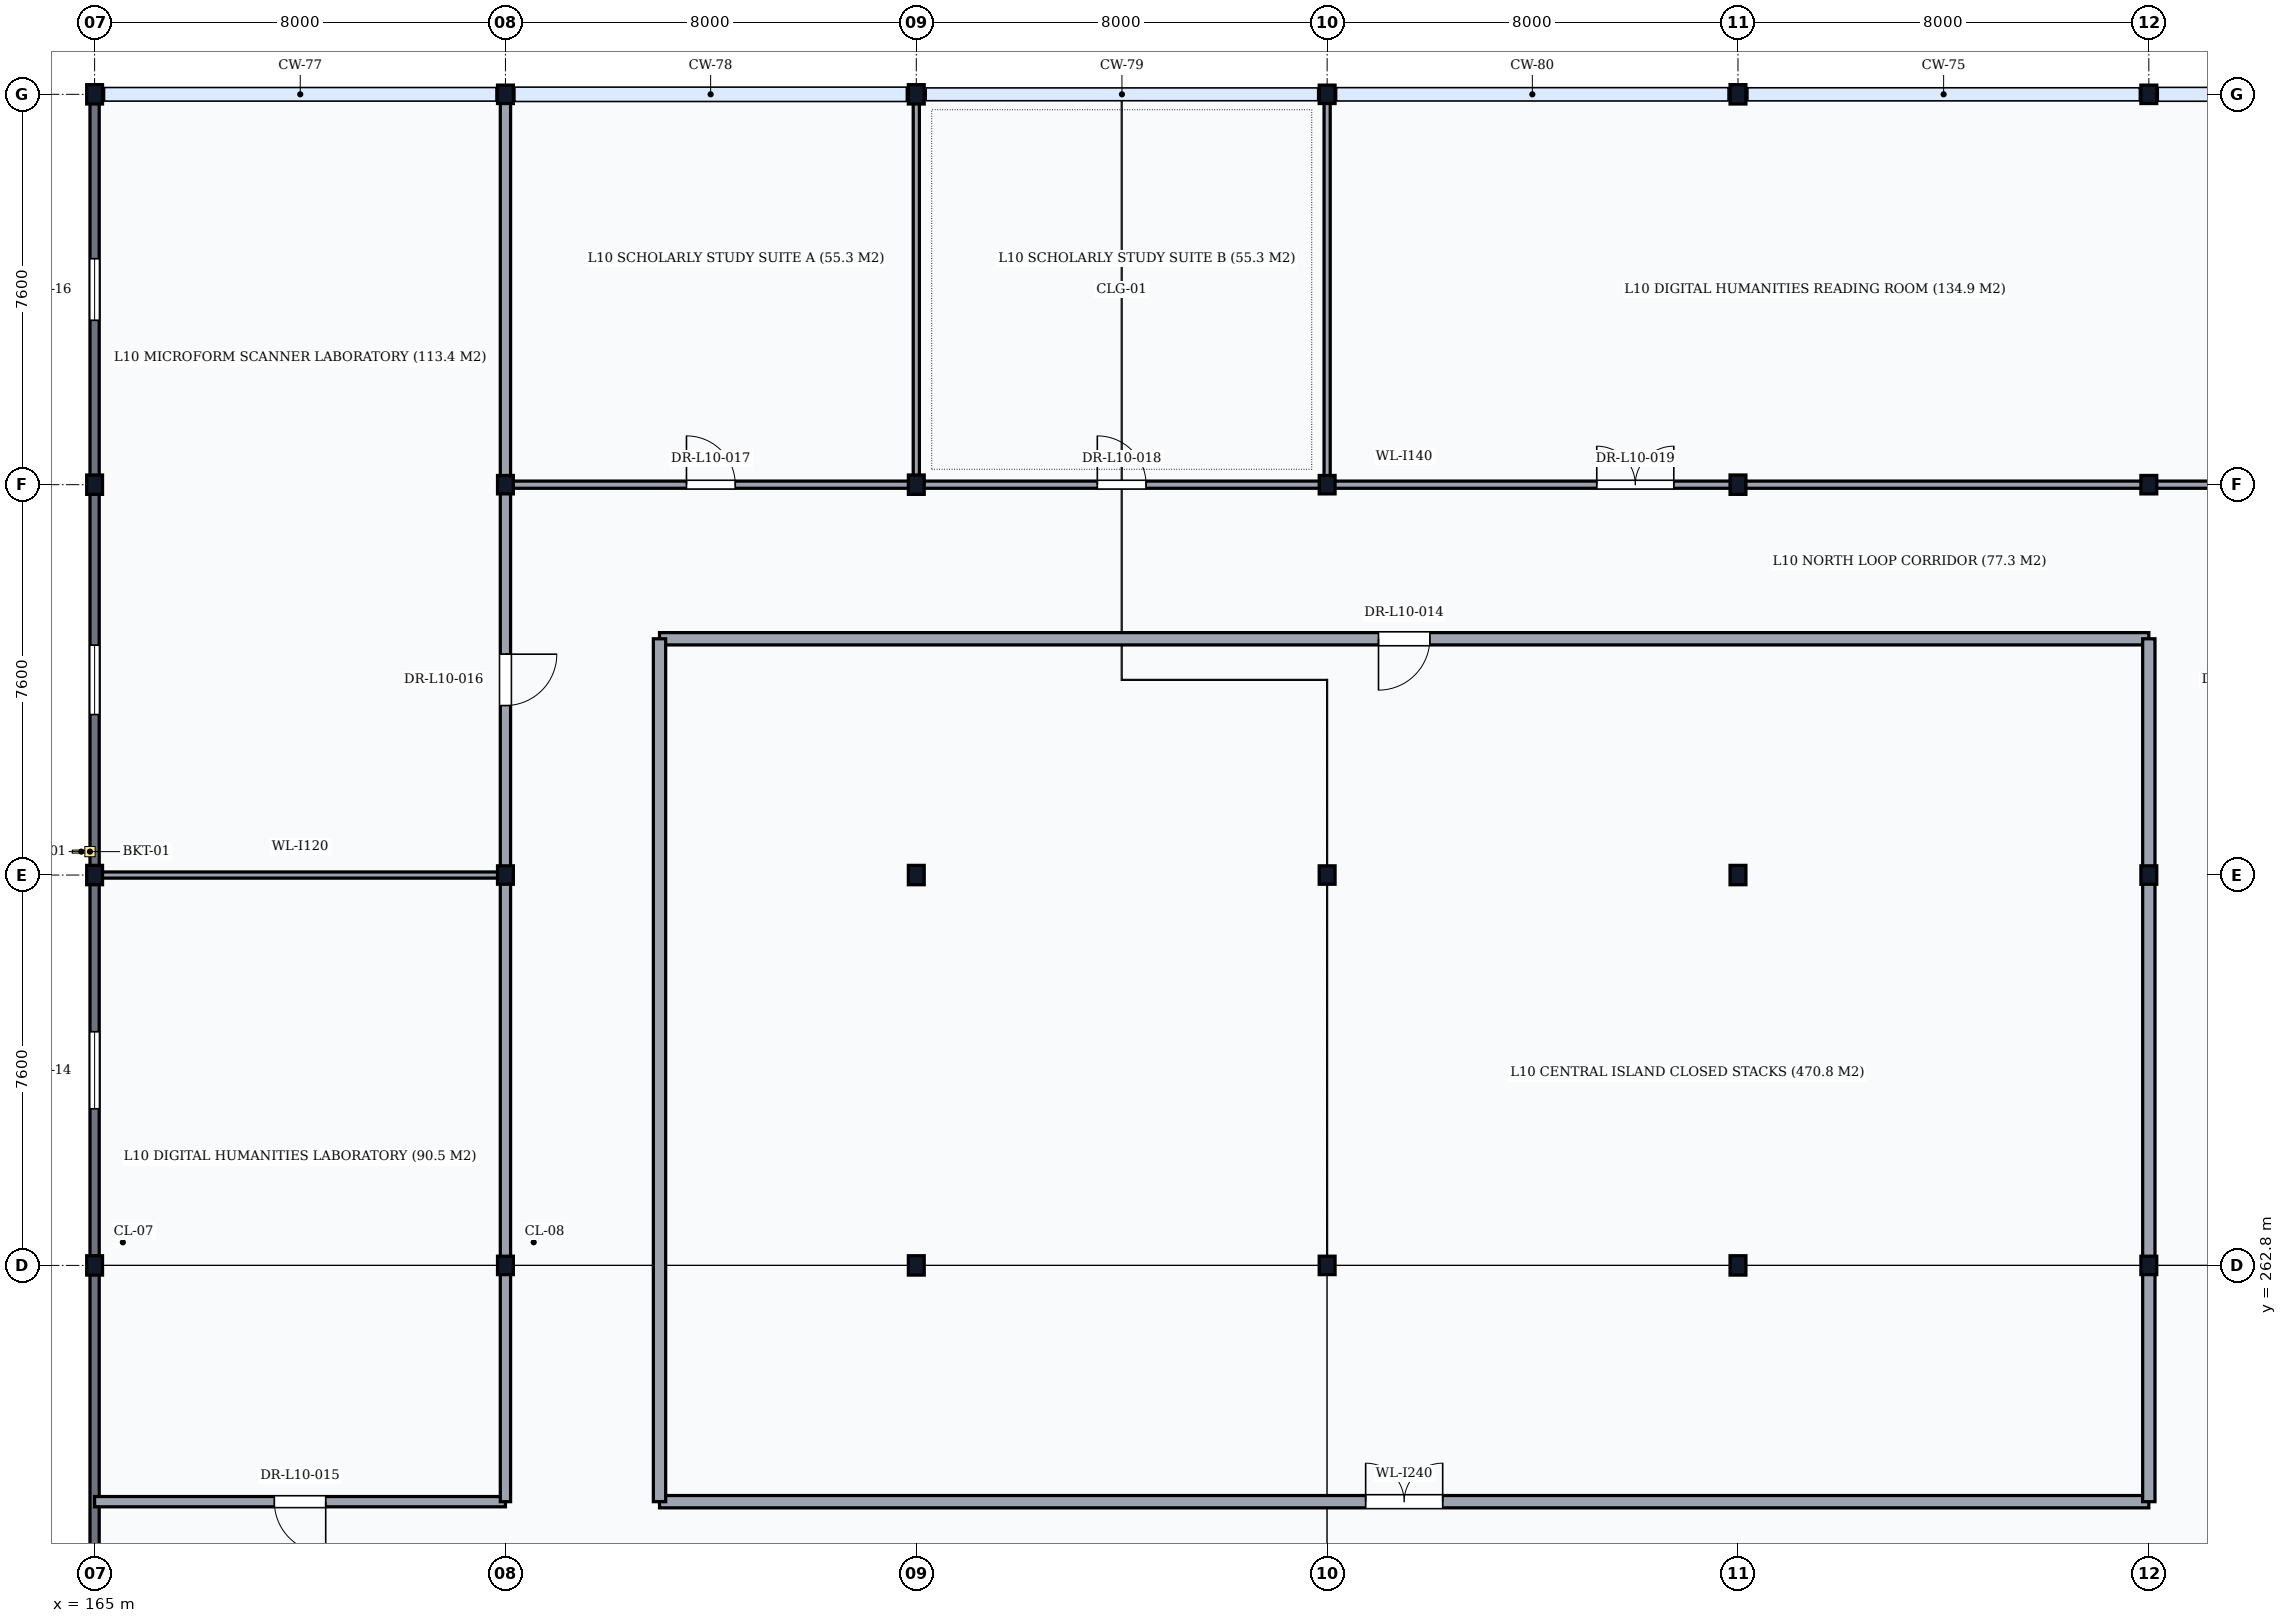
"""IFC4 building model, lengths in metres.
Left out: names, types, materials, properties, quantities, classifications, styles, units other than length and angle.
Written with IfcOpenShell. Run it as: python <this file> out.ifc"""

import sys

from ifc_helpers import new_model, si_unit, direction, frame, frame_2d, origin, origin_2d, place, context, subcontext, project, spatial, rectangle, i_section, extrude, element, fill, save


model = new_model("IFC4")
c1 = context("Model", 3, precision=1e-05, world=origin(), true_north=direction((0.0, 1.0)))
c2 = subcontext(c1, "Body", "Model", "MODEL_VIEW")
j1 = project(units=[si_unit("LENGTHUNIT", "METRE"), si_unit("PLANEANGLEUNIT", "RADIAN")], contexts=[c1])
p1 = place(None, origin())
s1 = spatial("IfcSite", under=j1, at=p1, CompositionType="ELEMENT")
p2 = place(p1, origin())
s2 = spatial("IfcBuilding", under=s1, at=p2, CompositionType="ELEMENT")
p3 = place(p2, frame((0.0, 0.0, 39.9)))
s3 = spatial("IfcBuildingStorey", under=s2, at=p3, CompositionType="ELEMENT", Elevation=39.9)
for number, where, z_axis, x_axis in (
    (1, (165.0, 262.8, 0.0), (0.0, 0.0, 1.0), (1.0, 0.0, 0.0)),
    (2, (165.0, 270.4, 0.0), (0.0, 0.0, 1.0), (1.0, 0.0, 0.0)),
    (3, (165.0, 278.0, 0.0), (0.0, 0.0, 1.0), (1.0, 0.0, 0.0)),
    (4, (165.0, 285.6, 0.0), (0.0, 0.0, 1.0), (1.0, 0.0, 0.0)),
):
    element("IfcColumn", number, at=place(p3, frame(where, z_axis=z_axis, x_axis=x_axis)), inside=s3, PredefinedType="COLUMN", context=c2, shape_type="SweptSolid", body=[
        extrude(i_section(OverallWidth=0.309, OverallDepth=0.377, WebThickness=0.021, FlangeThickness=0.04, FilletRadius=0.027, at=origin_2d()), origin(), (0.0, 0.0, 1.0), 3.9),
    ])
for number, where, z_axis, x_axis in (
    (5, (173.0, 262.8, 0.0), (0.0, 0.0, 1.0), (1.0, 0.0, 0.0)),
    (6, (173.0, 270.4, 0.0), (0.0, 0.0, 1.0), (1.0, 0.0, 0.0)),
    (7, (173.0, 278.0, 0.0), (0.0, 0.0, 1.0), (1.0, 0.0, 0.0)),
    (8, (173.0, 285.6, 0.0), (0.0, 0.0, 1.0), (1.0, 0.0, 0.0)),
):
    element("IfcColumn", number, at=place(p3, frame(where, z_axis=z_axis, x_axis=x_axis)), inside=s3, PredefinedType="COLUMN", context=c2, shape_type="SweptSolid", body=[
        extrude(i_section(OverallWidth=0.309, OverallDepth=0.359, WebThickness=0.021, FlangeThickness=0.04, FilletRadius=0.027, at=origin_2d()), origin(), (0.0, 0.0, 1.0), 3.9),
    ])
for number, where, z_axis, x_axis in (
    (9, (181.0, 262.8, 0.0), (0.0, 0.0, 1.0), (1.0, 0.0, 0.0)),
    (10, (181.0, 270.4, 0.0), (0.0, 0.0, 1.0), (1.0, 0.0, 0.0)),
    (11, (181.0, 278.0, 0.0), (0.0, 0.0, 1.0), (1.0, 0.0, 0.0)),
    (12, (181.0, 285.6, 0.0), (0.0, 0.0, 1.0), (1.0, 0.0, 0.0)),
):
    element("IfcColumn", number, at=place(p3, frame(where, z_axis=z_axis, x_axis=x_axis)), inside=s3, PredefinedType="COLUMN", context=c2, shape_type="SweptSolid", body=[
        extrude(i_section(OverallWidth=0.309, OverallDepth=0.377, WebThickness=0.021, FlangeThickness=0.04, FilletRadius=0.027, at=origin_2d()), origin(), (0.0, 0.0, 1.0), 3.9),
    ])
for number, where, z_axis, x_axis in (
    (13, (189.0, 262.8, 0.0), (0.0, 0.0, 1.0), (1.0, 0.0, 0.0)),
    (14, (189.0, 270.4, 0.0), (0.0, 0.0, 1.0), (1.0, 0.0, 0.0)),
    (15, (189.0, 278.0, 0.0), (0.0, 0.0, 1.0), (1.0, 0.0, 0.0)),
    (16, (189.0, 285.6, 0.0), (0.0, 0.0, 1.0), (1.0, 0.0, 0.0)),
):
    element("IfcColumn", number, at=place(p3, frame(where, z_axis=z_axis, x_axis=x_axis)), inside=s3, PredefinedType="COLUMN", context=c2, shape_type="SweptSolid", body=[
        extrude(i_section(OverallWidth=0.309, OverallDepth=0.359, WebThickness=0.021, FlangeThickness=0.04, FilletRadius=0.027, at=origin_2d()), origin(), (0.0, 0.0, 1.0), 3.9),
    ])
for number, where, z_axis, x_axis in (
    (17, (197.0, 262.8, 0.0), (0.0, 0.0, 1.0), (1.0, 0.0, 0.0)),
    (18, (197.0, 270.4, 0.0), (0.0, 0.0, 1.0), (1.0, 0.0, 0.0)),
    (19, (197.0, 278.0, 0.0), (0.0, 0.0, 1.0), (1.0, 0.0, 0.0)),
    (20, (197.0, 285.6, 0.0), (0.0, 0.0, 1.0), (1.0, 0.0, 0.0)),
):
    element("IfcColumn", number, at=place(p3, frame(where, z_axis=z_axis, x_axis=x_axis)), inside=s3, PredefinedType="COLUMN", context=c2, shape_type="SweptSolid", body=[
        extrude(i_section(OverallWidth=0.309, OverallDepth=0.377, WebThickness=0.021, FlangeThickness=0.04, FilletRadius=0.027, at=origin_2d()), origin(), (0.0, 0.0, 1.0), 3.9),
    ])
for number, where, z_axis, x_axis in (
    (21, (205.0, 262.8, 0.0), (0.0, 0.0, 1.0), (1.0, 0.0, 0.0)),
    (22, (205.0, 270.4, 0.0), (0.0, 0.0, 1.0), (1.0, 0.0, 0.0)),
    (23, (205.0, 278.0, 0.0), (0.0, 0.0, 1.0), (1.0, 0.0, 0.0)),
    (24, (205.0, 285.6, 0.0), (0.0, 0.0, 1.0), (1.0, 0.0, 0.0)),
):
    element("IfcColumn", number, at=place(p3, frame(where, z_axis=z_axis, x_axis=x_axis)), inside=s3, PredefinedType="COLUMN", context=c2, shape_type="SweptSolid", body=[
        extrude(i_section(OverallWidth=0.309, OverallDepth=0.359, WebThickness=0.021, FlangeThickness=0.04, FilletRadius=0.027, at=origin_2d()), origin(), (0.0, 0.0, 1.0), 3.9),
    ])
p4 = place(p3, frame((165.0, 255.206, 0.0), z_axis=(0.0, 0.0, 1.0), x_axis=(0.0, 1.0, 0.0)))
e25 = element("IfcWall", 25, at=p4, inside=s3, PredefinedType="SOLIDWALL", context=c2, shape_type="SweptSolid", body=[
    extrude(rectangle(XDim=7.588, YDim=0.18, at=frame_2d((3.794, 0.0))), origin(), (0.0, 0.0, 1.0), 3.408),
])
p5 = place(p3, frame((165.0, 262.806, 0.0), z_axis=(0.0, 0.0, 1.0), x_axis=(0.0, 1.0, 0.0)))
e26 = element("IfcWall", 26, at=p5, inside=s3, PredefinedType="SOLIDWALL", context=c2, shape_type="SweptSolid", body=[
    extrude(rectangle(XDim=7.588, YDim=0.18, at=frame_2d((3.794, 0.0))), origin(), (0.0, 0.0, 1.0), 3.408),
])
p6 = place(p5, frame((3.044, 0.0, 0.95)))
e27 = element("IfcOpeningElement", 27, at=p6, cuts=e26, PredefinedType="OPENING", context=c2, shape_type="SweptSolid", body=[
    extrude(rectangle(XDim=1.5, YDim=1.9, at=frame_2d((0.75, 0.95))), frame((0.0, 0.105, 0.0), z_axis=(0.0, -1.0, 0.0), x_axis=(1.0, 0.0, 0.0)), (0.0, 0.0, 1.0), 0.21),
])
p7 = place(p3, frame((165.0, 270.406, 0.0), z_axis=(0.0, 0.0, 1.0), x_axis=(0.0, 1.0, 0.0)))
e28 = element("IfcWall", 28, at=p7, inside=s3, PredefinedType="SOLIDWALL", context=c2, shape_type="SweptSolid", body=[
    extrude(rectangle(XDim=7.588, YDim=0.18, at=frame_2d((3.794, 0.0))), origin(), (0.0, 0.0, 1.0), 3.408),
])
p8 = place(p7, frame((3.119, 0.0, 0.95)))
e29 = element("IfcOpeningElement", 29, at=p8, cuts=e28, PredefinedType="OPENING", context=c2, shape_type="SweptSolid", body=[
    extrude(rectangle(XDim=1.35, YDim=1.8, at=frame_2d((0.675, 0.9))), frame((0.0, 0.105, 0.0), z_axis=(0.0, -1.0, 0.0), x_axis=(1.0, 0.0, 0.0)), (0.0, 0.0, 1.0), 0.21),
])
p9 = place(p3, frame((165.0, 278.006, 0.0), z_axis=(0.0, 0.0, 1.0), x_axis=(0.0, 1.0, 0.0)))
e30 = element("IfcWall", 30, at=p9, inside=s3, PredefinedType="SOLIDWALL", context=c2, shape_type="SweptSolid", body=[
    extrude(rectangle(XDim=7.588, YDim=0.18, at=frame_2d((3.794, 0.0))), origin(), (0.0, 0.0, 1.0), 3.408),
])
p10 = place(p9, frame((3.194, 0.0, 0.95)))
e31 = element("IfcOpeningElement", 31, at=p10, cuts=e30, PredefinedType="OPENING", context=c2, shape_type="SweptSolid", body=[
    extrude(rectangle(XDim=1.2, YDim=1.8, at=frame_2d((0.6, 0.9))), frame((0.0, 0.105, 0.0), z_axis=(0.0, -1.0, 0.0), x_axis=(1.0, 0.0, 0.0)), (0.0, 0.0, 1.0), 0.21),
])
p11 = place(p3, frame((176.0, 258.2, 0.0), z_axis=(0.0, 0.0, 1.0), x_axis=(1.0, 0.0, 0.0)))
e32 = element("IfcWall", 32, at=p11, inside=s3, PredefinedType="PARTITIONING", context=c2, shape_type="SweptSolid", body=[
    extrude(rectangle(XDim=29.0, YDim=0.24, at=frame_2d((14.5, 0.0))), origin(), (0.0, 0.0, 1.0), 3.68),
])
p12 = place(p11, frame((13.75, 0.0, 0.0)))
e33 = element("IfcOpeningElement", 33, at=p12, cuts=e32, PredefinedType="OPENING", context=c2, shape_type="SweptSolid", body=[
    extrude(rectangle(XDim=1.5, YDim=2.1, at=frame_2d((0.75, 1.05))), frame((0.0, 0.135, 0.0), z_axis=(0.0, -1.0, 0.0), x_axis=(1.0, 0.0, 0.0)), (0.0, 0.0, 1.0), 0.27),
])
p13 = place(p3, frame((176.0, 275.0, 0.0), z_axis=(0.0, 0.0, 1.0), x_axis=(1.0, 0.0, 0.0)))
e34 = element("IfcWall", 34, at=p13, inside=s3, PredefinedType="PARTITIONING", context=c2, shape_type="SweptSolid", body=[
    extrude(rectangle(XDim=29.0, YDim=0.24, at=frame_2d((14.5, 0.0))), origin(), (0.0, 0.0, 1.0), 3.68),
])
p14 = place(p13, frame((14.0, 0.0, 0.0)))
e35 = element("IfcOpeningElement", 35, at=p14, cuts=e34, PredefinedType="OPENING", context=c2, shape_type="SweptSolid", body=[
    extrude(rectangle(XDim=1.0, YDim=2.1, at=frame_2d((0.5, 1.05))), frame((0.0, 0.135, 0.0), z_axis=(0.0, -1.0, 0.0), x_axis=(1.0, 0.0, 0.0)), (0.0, 0.0, 1.0), 0.27),
])
p15 = place(p3, frame((176.0, 258.2, 0.0), z_axis=(0.0, 0.0, 1.0), x_axis=(0.0, 1.0, 0.0)))
e36 = element("IfcWall", 36, at=p15, inside=s3, PredefinedType="PARTITIONING", context=c2, shape_type="SweptSolid", body=[
    extrude(rectangle(XDim=16.8, YDim=0.24, at=frame_2d((8.4, 0.0))), origin(), (0.0, 0.0, 1.0), 3.68),
])
p16 = place(p3, frame((205.0, 258.2, 0.0), z_axis=(0.0, 0.0, 1.0), x_axis=(0.0, 1.0, 0.0)))
e37 = element("IfcWall", 37, at=p16, inside=s3, PredefinedType="PARTITIONING", context=c2, shape_type="SweptSolid", body=[
    extrude(rectangle(XDim=16.8, YDim=0.24, at=frame_2d((8.4, 0.0))), origin(), (0.0, 0.0, 1.0), 3.278),
])
p17 = place(p3, frame((165.0, 258.2, 0.0), z_axis=(0.0, 0.0, 1.0), x_axis=(1.0, 0.0, 0.0)))
e38 = element("IfcWall", 38, at=p17, inside=s3, PredefinedType="PARTITIONING", context=c2, shape_type="SweptSolid", body=[
    extrude(rectangle(XDim=8.0, YDim=0.2, at=frame_2d((4.0, 0.0))), origin(), (0.0, 0.0, 1.0), 3.68),
])
p18 = place(p17, frame((3.5, 0.0, 0.0)))
e39 = element("IfcOpeningElement", 39, at=p18, cuts=e38, PredefinedType="OPENING", context=c2, shape_type="SweptSolid", body=[
    extrude(rectangle(XDim=1.0, YDim=2.1, at=frame_2d((0.5, 1.05))), frame((0.0, 0.115, 0.0), z_axis=(0.0, -1.0, 0.0), x_axis=(1.0, 0.0, 0.0)), (0.0, 0.0, 1.0), 0.23),
])
p19 = place(p3, frame((173.0, 258.2, 0.0), z_axis=(0.0, 0.0, 1.0), x_axis=(0.0, 1.0, 0.0)))
e40 = element("IfcWall", 40, at=p19, inside=s3, PredefinedType="PARTITIONING", context=c2, shape_type="SweptSolid", body=[
    extrude(rectangle(XDim=27.4, YDim=0.2, at=frame_2d((13.7, 0.0))), origin(), (0.0, 0.0, 1.0), 3.278),
])
p20 = place(p19, frame((15.5, 0.0, 0.0)))
e41 = element("IfcOpeningElement", 41, at=p20, cuts=e40, PredefinedType="OPENING", context=c2, shape_type="SweptSolid", body=[
    extrude(rectangle(XDim=1.0, YDim=2.1, at=frame_2d((0.5, 1.05))), frame((0.0, 0.115, 0.0), z_axis=(0.0, -1.0, 0.0), x_axis=(1.0, 0.0, 0.0)), (0.0, 0.0, 1.0), 0.23),
])
p21 = place(p3, frame((165.0, 270.4, 0.0), z_axis=(0.0, 0.0, 1.0), x_axis=(1.0, 0.0, 0.0)))
e42 = element("IfcWall", 42, at=p21, inside=s3, PredefinedType="PARTITIONING", context=c2, shape_type="SweptSolid", body=[
    extrude(rectangle(XDim=8.0, YDim=0.12, at=frame_2d((4.0, 0.0))), origin(), (0.0, 0.0, 1.0), 3.178),
])
p22 = place(p3, frame((173.0, 278.0, 0.0), z_axis=(0.0, 0.0, 1.0), x_axis=(1.0, 0.0, 0.0)))
e43 = element("IfcWall", 43, at=p22, inside=s3, PredefinedType="PARTITIONING", context=c2, shape_type="SweptSolid", body=[
    extrude(rectangle(XDim=35.0, YDim=0.14, at=frame_2d((17.5, 0.0))), origin(), (0.0, 0.0, 1.0), 3.178),
])
p23 = place(p22, frame((3.525, 0.0, 0.0)))
e44 = element("IfcOpeningElement", 44, at=p23, cuts=e43, PredefinedType="OPENING", context=c2, shape_type="SweptSolid", body=[
    extrude(rectangle(XDim=0.95, YDim=2.1, at=frame_2d((0.475, 1.05))), frame((0.0, 0.085, 0.0), z_axis=(0.0, -1.0, 0.0), x_axis=(1.0, 0.0, 0.0)), (0.0, 0.0, 1.0), 0.17),
])
p24 = place(p22, frame((11.525, 0.0, 0.0)))
e45 = element("IfcOpeningElement", 45, at=p24, cuts=e43, PredefinedType="OPENING", context=c2, shape_type="SweptSolid", body=[
    extrude(rectangle(XDim=0.95, YDim=2.1, at=frame_2d((0.475, 1.05))), frame((0.0, 0.085, 0.0), z_axis=(0.0, -1.0, 0.0), x_axis=(1.0, 0.0, 0.0)), (0.0, 0.0, 1.0), 0.17),
])
p25 = place(p22, frame((21.25, 0.0, 0.0)))
e46 = element("IfcOpeningElement", 46, at=p25, cuts=e43, PredefinedType="OPENING", context=c2, shape_type="SweptSolid", body=[
    extrude(rectangle(XDim=1.5, YDim=2.25, at=frame_2d((0.75, 1.125))), frame((0.0, 0.085, 0.0), z_axis=(0.0, -1.0, 0.0), x_axis=(1.0, 0.0, 0.0)), (0.0, 0.0, 1.0), 0.17),
])
for number, where, z_axis, x_axis in (
    (47, (181.0, 278.0, 0.0), (0.0, 0.0, 1.0), (0.0, 1.0, 0.0)),
    (48, (189.0, 278.0, 0.0), (0.0, 0.0, 1.0), (0.0, 1.0, 0.0)),
):
    element("IfcWall", number, at=place(p3, frame(where, z_axis=z_axis, x_axis=x_axis)), inside=s3, PredefinedType="PARTITIONING", context=c2, shape_type="SweptSolid", body=[
        extrude(rectangle(XDim=7.6, YDim=0.12, at=frame_2d((3.8, 0.0))), origin(), (0.0, 0.0, 1.0), 3.278),
    ])
p26 = place(p6, origin())
e49 = element("IfcWindow", 49, at=p26, inside=s3, PartitioningType="SINGLE_PANEL", PredefinedType="WINDOW", context=c2, shape_type="SweptSolid", body=[
    extrude(rectangle(XDim=1.5, YDim=1.9, at=frame_2d((0.75, 0.95))), frame((0.0, 0.03, 0.0), z_axis=(0.0, -1.0, 0.0), x_axis=(1.0, 0.0, 0.0)), (0.0, 0.0, 1.0), 0.06),
])
fill(e27, e49)
p27 = place(p8, origin())
e50 = element("IfcWindow", 50, at=p27, inside=s3, PartitioningType="SINGLE_PANEL", PredefinedType="WINDOW", context=c2, shape_type="SweptSolid", body=[
    extrude(rectangle(XDim=1.35, YDim=1.8, at=frame_2d((0.675, 0.9))), frame((0.0, 0.03, 0.0), z_axis=(0.0, -1.0, 0.0), x_axis=(1.0, 0.0, 0.0)), (0.0, 0.0, 1.0), 0.06),
])
fill(e29, e50)
p28 = place(p10, origin())
e51 = element("IfcWindow", 51, at=p28, inside=s3, PartitioningType="SINGLE_PANEL", PredefinedType="WINDOW", context=c2, shape_type="SweptSolid", body=[
    extrude(rectangle(XDim=1.2, YDim=1.8, at=frame_2d((0.6, 0.9))), frame((0.0, 0.03, 0.0), z_axis=(0.0, -1.0, 0.0), x_axis=(1.0, 0.0, 0.0)), (0.0, 0.0, 1.0), 0.06),
])
fill(e31, e51)
p29 = place(p12, origin())
e52 = element("IfcDoor", 52, at=p29, inside=s3, OperationType="DOUBLE_DOOR_SINGLE_SWING", PredefinedType="DOOR", context=c2, shape_type="SweptSolid", body=[
    extrude(rectangle(XDim=1.5, YDim=2.1, at=frame_2d((0.75, 1.05))), frame((0.0, 0.025, 0.0), z_axis=(0.0, -1.0, 0.0), x_axis=(1.0, 0.0, 0.0)), (0.0, 0.0, 1.0), 0.05),
])
fill(e33, e52)
p30 = place(p14, frame((1.0, 0.0, 0.0), z_axis=(0.0, 0.0, 1.0), x_axis=(-1.0, 0.0, 0.0)))
e53 = element("IfcDoor", 53, at=p30, inside=s3, OperationType="SINGLE_SWING_RIGHT", PredefinedType="DOOR", context=c2, shape_type="SweptSolid", body=[
    extrude(rectangle(XDim=1.0, YDim=2.1, at=frame_2d((0.5, 1.05))), frame((0.0, 0.025, 0.0), z_axis=(0.0, -1.0, 0.0), x_axis=(1.0, 0.0, 0.0)), (0.0, 0.0, 1.0), 0.05),
])
fill(e35, e53)
p31 = place(p18, origin())
e54 = element("IfcDoor", 54, at=p31, inside=s3, OperationType="SINGLE_SWING_RIGHT", PredefinedType="DOOR", context=c2, shape_type="SweptSolid", body=[
    extrude(rectangle(XDim=1.0, YDim=2.1, at=frame_2d((0.5, 1.05))), frame((0.0, 0.025, 0.0), z_axis=(0.0, -1.0, 0.0), x_axis=(1.0, 0.0, 0.0)), (0.0, 0.0, 1.0), 0.05),
])
fill(e39, e54)
p32 = place(p20, origin())
e55 = element("IfcDoor", 55, at=p32, inside=s3, OperationType="SINGLE_SWING_RIGHT", PredefinedType="DOOR", context=c2, shape_type="SweptSolid", body=[
    extrude(rectangle(XDim=1.0, YDim=2.1, at=frame_2d((0.5, 1.05))), frame((0.0, 0.025, 0.0), z_axis=(0.0, -1.0, 0.0), x_axis=(1.0, 0.0, 0.0)), (0.0, 0.0, 1.0), 0.05),
])
fill(e41, e55)
p33 = place(p23, origin())
e56 = element("IfcDoor", 56, at=p33, inside=s3, OperationType="SINGLE_SWING_LEFT", PredefinedType="DOOR", context=c2, shape_type="SweptSolid", body=[
    extrude(rectangle(XDim=0.95, YDim=2.1, at=frame_2d((0.475, 1.05))), frame((0.0, 0.025, 0.0), z_axis=(0.0, -1.0, 0.0), x_axis=(1.0, 0.0, 0.0)), (0.0, 0.0, 1.0), 0.05),
])
fill(e44, e56)
p34 = place(p24, origin())
e57 = element("IfcDoor", 57, at=p34, inside=s3, OperationType="SINGLE_SWING_LEFT", PredefinedType="DOOR", context=c2, shape_type="SweptSolid", body=[
    extrude(rectangle(XDim=0.95, YDim=2.1, at=frame_2d((0.475, 1.05))), frame((0.0, 0.025, 0.0), z_axis=(0.0, -1.0, 0.0), x_axis=(1.0, 0.0, 0.0)), (0.0, 0.0, 1.0), 0.05),
])
fill(e45, e57)
p35 = place(p25, origin())
e58 = element("IfcDoor", 58, at=p35, inside=s3, OperationType="DOUBLE_DOOR_SINGLE_SWING", PredefinedType="DOOR", context=c2, shape_type="SweptSolid", body=[
    extrude(rectangle(XDim=1.5, YDim=2.25, at=frame_2d((0.75, 1.125))), frame((0.0, 0.025, 0.0), z_axis=(0.0, -1.0, 0.0), x_axis=(1.0, 0.0, 0.0)), (0.0, 0.0, 1.0), 0.05),
])
fill(e46, e58)
save(model, sys.argv[1])
